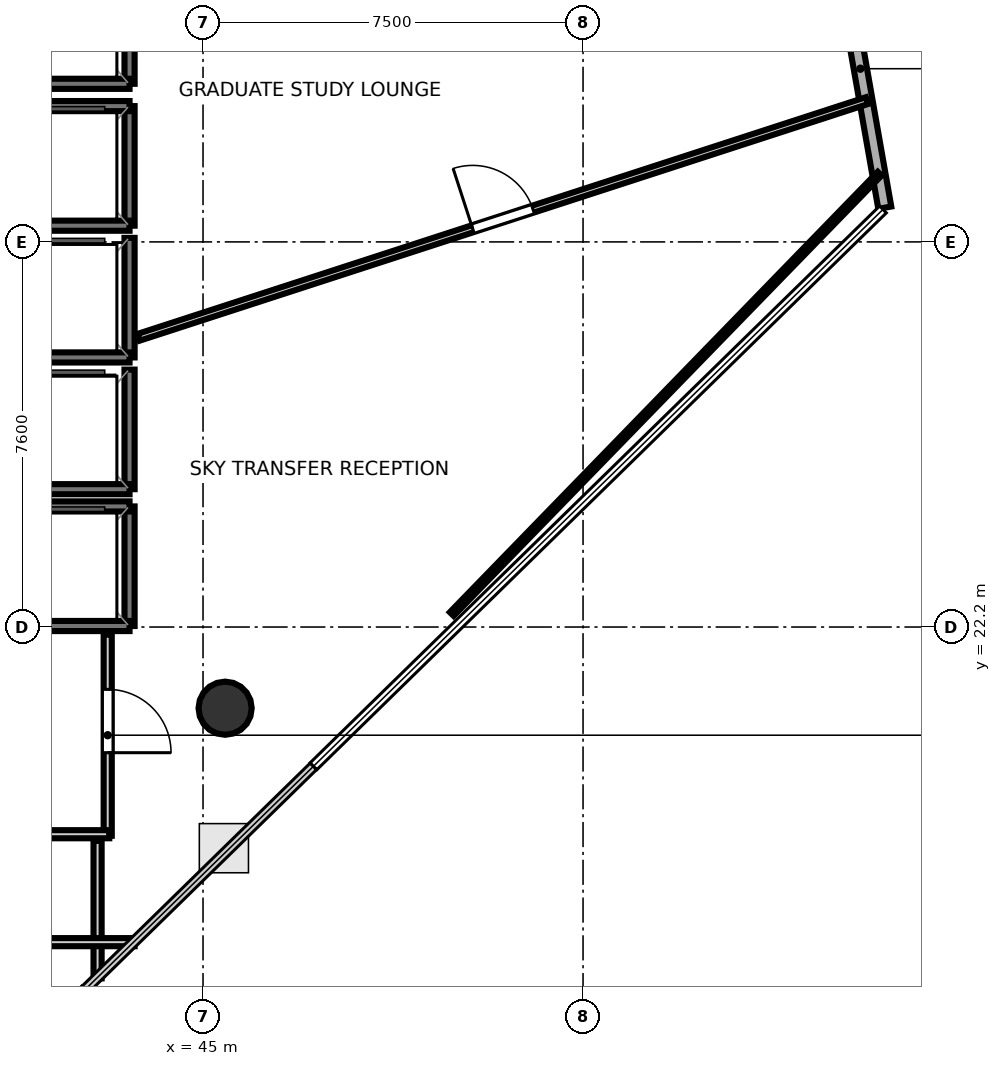
"""IFC4 building model, lengths in metres.
Left out: names, types, materials, properties, quantities, classifications, styles, units other than length and angle.
Written with IfcOpenShell. Run it as: python <this file> out.ifc"""

import sys

from ifc_helpers import new_model, si_unit, direction, frame, frame_2d, origin, origin_2d, place, context, subcontext, project, spatial, rectangle, hollow_circle, extrude, element, fill, save


model = new_model("IFC4")
c1 = context("Model", 3, precision=1e-05, world=origin(), true_north=direction((0.0, 1.0)))
c2 = subcontext(c1, "Body", "Model", "MODEL_VIEW")
j1 = project(units=[si_unit("LENGTHUNIT", "METRE"), si_unit("PLANEANGLEUNIT", "RADIAN")], contexts=[c1])
p1 = place(None, origin())
s1 = spatial("IfcSite", under=j1, at=p1, CompositionType="ELEMENT")
p2 = place(p1, origin())
s2 = spatial("IfcBuilding", under=s1, at=p2, CompositionType="ELEMENT")
p3 = place(p2, frame((0.0, 0.0, 234.5)))
s3 = spatial("IfcBuildingStorey", under=s2, at=p3, CompositionType="ELEMENT", Elevation=234.5)
p4 = place(p3, frame((45.436, 20.598, -0.27), z_axis=(0.0, 0.0, 1.0), x_axis=(1.0, 0.0, 0.0)))
e1 = element("IfcColumn", 1, at=p4, inside=s3, PredefinedType="COLUMN", context=c2, shape_type="SweptSolid", body=[
    extrude(hollow_circle(Radius=0.525, WallThickness=0.028, at=origin_2d()), origin(), (0.0, 0.0, 1.0), 4.77),
])
p5 = place(p3, frame((58.455, 30.475, 0.0), z_axis=(0.0, 0.0, 1.0), x_axis=(-0.173235165229, 0.984880488957, 0.0)))
e2 = element("IfcWall", 2, at=p5, inside=s3, PredefinedType="SOLIDWALL", context=c2, shape_type="SweptSolid", body=[
    extrude(rectangle(XDim=5.57, YDim=0.26, at=frame_2d((2.785, 0.0))), origin(), (0.0, 0.0, 1.0), 4.32),
])
p6 = place(p3, frame((43.55, 30.12, 0.0), z_axis=(0.0, 0.0, 1.0), x_axis=(0.0, 1.0, 0.0)))
e3 = element("IfcWall", 3, at=p6, inside=s3, PredefinedType="SOLIDWALL", context=c2, shape_type="SweptSolid", body=[
    extrude(rectangle(XDim=2.36, YDim=0.2, at=frame_2d((1.18, 0.0))), origin(), (0.0, 0.0, 1.0), 4.32),
])
for number, where, z_axis, x_axis in (
    (4, (41.45, 32.48, 0.0), (0.0, 0.0, 1.0), (1.0, 0.0, 0.0)),
    (5, (41.45, 30.12, 0.0), (0.0, 0.0, 1.0), (1.0, 0.0, 0.0)),
):
    element("IfcWall", number, at=place(p3, frame(where, z_axis=z_axis, x_axis=x_axis)), inside=s3, PredefinedType="SOLIDWALL", context=c2, shape_type="SweptSolid", body=[
        extrude(rectangle(XDim=2.1, YDim=0.2, at=frame_2d((1.05, 0.0))), origin(), (0.0, 0.0, 1.0), 4.32),
    ])
p7 = place(p3, frame((43.55, 27.52, 0.0), z_axis=(0.0, 0.0, 1.0), x_axis=(0.0, 1.0, 0.0)))
e6 = element("IfcWall", 6, at=p7, inside=s3, PredefinedType="SOLIDWALL", context=c2, shape_type="SweptSolid", body=[
    extrude(rectangle(XDim=2.36, YDim=0.2, at=frame_2d((1.18, 0.0))), origin(), (0.0, 0.0, 1.0), 4.32),
])
p8 = place(p3, frame((41.45, 27.52, 0.0), z_axis=(0.0, 0.0, 1.0), x_axis=(1.0, 0.0, 0.0)))
e7 = element("IfcWall", 7, at=p8, inside=s3, PredefinedType="SOLIDWALL", context=c2, shape_type="SweptSolid", body=[
    extrude(rectangle(XDim=2.1, YDim=0.2, at=frame_2d((1.05, 0.0))), origin(), (0.0, 0.0, 1.0), 4.32),
])
p9 = place(p3, frame((43.55, 24.92, 0.0), z_axis=(0.0, 0.0, 1.0), x_axis=(0.0, 1.0, 0.0)))
e8 = element("IfcWall", 8, at=p9, inside=s3, PredefinedType="SOLIDWALL", context=c2, shape_type="SweptSolid", body=[
    extrude(rectangle(XDim=2.36, YDim=0.2, at=frame_2d((1.18, 0.0))), origin(), (0.0, 0.0, 1.0), 4.32),
])
p10 = place(p3, frame((41.45, 24.92, 0.0), z_axis=(0.0, 0.0, 1.0), x_axis=(1.0, 0.0, 0.0)))
e9 = element("IfcWall", 9, at=p10, inside=s3, PredefinedType="SOLIDWALL", context=c2, shape_type="SweptSolid", body=[
    extrude(rectangle(XDim=2.1, YDim=0.2, at=frame_2d((1.05, 0.0))), origin(), (0.0, 0.0, 1.0), 4.32),
])
p11 = place(p3, frame((43.55, 22.22, 0.0), z_axis=(0.0, 0.0, 1.0), x_axis=(0.0, 1.0, 0.0)))
e10 = element("IfcWall", 10, at=p11, inside=s3, PredefinedType="SOLIDWALL", context=c2, shape_type="SweptSolid", body=[
    extrude(rectangle(XDim=2.36, YDim=0.2, at=frame_2d((1.18, 0.0))), origin(), (0.0, 0.0, 1.0), 4.32),
])
for number, where, z_axis, x_axis in (
    (11, (41.45, 24.58, 0.0), (0.0, 0.0, 1.0), (1.0, 0.0, 0.0)),
    (12, (41.45, 22.22, 0.0), (0.0, 0.0, 1.0), (1.0, 0.0, 0.0)),
):
    element("IfcWall", number, at=place(p3, frame(where, z_axis=z_axis, x_axis=x_axis)), inside=s3, PredefinedType="SOLIDWALL", context=c2, shape_type="SweptSolid", body=[
        extrude(rectangle(XDim=2.1, YDim=0.2, at=frame_2d((1.05, 0.0))), origin(), (0.0, 0.0, 1.0), 4.32),
    ])
p12 = place(p3, frame((43.55, 32.92, 0.0), z_axis=(0.0, 0.0, 1.0), x_axis=(0.0, 1.0, 0.0)))
e13 = element("IfcWall", 13, at=p12, inside=s3, PredefinedType="SOLIDWALL", context=c2, shape_type="SweptSolid", body=[
    extrude(rectangle(XDim=2.36, YDim=0.2, at=frame_2d((1.18, 0.0))), origin(), (0.0, 0.0, 1.0), 4.32),
])
p13 = place(p3, frame((41.45, 32.92, 0.0), z_axis=(0.0, 0.0, 1.0), x_axis=(1.0, 0.0, 0.0)))
e14 = element("IfcWall", 14, at=p13, inside=s3, PredefinedType="SOLIDWALL", context=c2, shape_type="SweptSolid", body=[
    extrude(rectangle(XDim=2.1, YDim=0.2, at=frame_2d((1.05, 0.0))), origin(), (0.0, 0.0, 1.0), 4.32),
])
p14 = place(p3, frame((43.119, 22.05, 0.0), z_axis=(0.0, 0.0, 1.0), x_axis=(0.0, -1.0, 0.0)))
e15 = element("IfcWall", 15, at=p14, inside=s3, PredefinedType="PARTITIONING", context=c2, shape_type="SweptSolid", body=[
    extrude(rectangle(XDim=3.97, YDim=0.16, at=frame_2d((1.985, 0.0))), origin(), (0.0, 0.0, 1.0), 3.64),
])
p15 = place(p14, frame((1.08, 0.0, 0.0)))
e16 = element("IfcOpeningElement", 16, at=p15, cuts=e15, PredefinedType="OPENING", context=c2, shape_type="SweptSolid", body=[
    extrude(rectangle(XDim=1.25, YDim=2.2, at=frame_2d((0.625, 1.1))), frame((0.0, 0.09, 0.0), z_axis=(0.0, -1.0, 0.0), x_axis=(1.0, 0.0, 0.0)), (0.0, 0.0, 1.0), 0.18),
])
p16 = place(p3, frame((43.15, 18.111, 0.0), z_axis=(0.0, 0.0, 1.0), x_axis=(-1.0, 0.0, 0.0)))
e17 = element("IfcWall", 17, at=p16, inside=s3, PredefinedType="PARTITIONING", context=c2, shape_type="SweptSolid", body=[
    extrude(rectangle(XDim=2.73, YDim=0.16, at=frame_2d((1.365, 0.0))), origin(), (0.0, 0.0, 1.0), 3.64),
])
p17 = place(p16, frame((1.185, 0.0, 0.0)))
e18 = element("IfcOpeningElement", 18, at=p17, cuts=e17, PredefinedType="OPENING", context=c2, shape_type="SweptSolid", body=[
    extrude(rectangle(XDim=1.2, YDim=2.15, at=frame_2d((0.6, 1.075))), frame((0.0, 0.09, 0.0), z_axis=(0.0, -1.0, 0.0), x_axis=(1.0, 0.0, 0.0)), (0.0, 0.0, 1.0), 0.18),
])
p18 = place(p3, frame((42.919, 17.98, 0.0), z_axis=(0.0, 0.0, 1.0), x_axis=(0.0, -1.0, 0.0)))
e19 = element("IfcWall", 19, at=p18, inside=s3, PredefinedType="PARTITIONING", context=c2, shape_type="SweptSolid", body=[
    extrude(rectangle(XDim=2.714, YDim=0.16, at=frame_2d((1.357, 0.0))), origin(), (0.0, 0.0, 1.0), 3.64),
])
p19 = place(p3, frame((43.65, 15.981, 0.0), z_axis=(0.0, 0.0, 1.0), x_axis=(-1.0, 0.0, 0.0)))
e20 = element("IfcWall", 20, at=p19, inside=s3, PredefinedType="PARTITIONING", context=c2, shape_type="SweptSolid", body=[
    extrude(rectangle(XDim=15.05, YDim=0.16, at=frame_2d((7.525, 0.0))), origin(), (0.0, 0.0, 1.0), 3.64),
])
p20 = place(p19, frame((8.28, 0.0, 0.0)))
e21 = element("IfcOpeningElement", 21, at=p20, cuts=e20, PredefinedType="OPENING", context=c2, shape_type="SweptSolid", body=[
    extrude(rectangle(XDim=1.25, YDim=2.2, at=frame_2d((0.625, 1.1))), frame((0.0, 0.09, 0.0), z_axis=(0.0, -1.0, 0.0), x_axis=(1.0, 0.0, 0.0)), (0.0, 0.0, 1.0), 0.18),
])
p21 = place(p3, frame((43.729, 27.918, 0.0), z_axis=(0.0, 0.0, 1.0), x_axis=(0.951056383536, 0.309017402966, 0.0)))
e22 = element("IfcWall", 22, at=p21, inside=s3, PredefinedType="PARTITIONING", context=c2, shape_type="SweptSolid", body=[
    extrude(rectangle(XDim=15.114, YDim=0.14, at=frame_2d((7.557, 0.0))), origin(), (0.0, 0.0, 1.0), 3.64),
])
p22 = place(p21, frame((6.932, 0.0, 0.0)))
e23 = element("IfcOpeningElement", 23, at=p22, cuts=e22, PredefinedType="OPENING", context=c2, shape_type="SweptSolid", body=[
    extrude(rectangle(XDim=1.25, YDim=2.2, at=frame_2d((0.625, 1.1))), frame((0.0, 0.08, 0.0), z_axis=(0.0, -1.0, 0.0), x_axis=(1.0, 0.0, 0.0)), (0.0, 0.0, 1.0), 0.16),
])
p23 = place(p3, frame((58.354, 31.147, 0.0), z_axis=(0.0, 0.0, 1.0), x_axis=(-0.696869785683, -0.717197672753, 0.0)))
e24 = element("IfcWall", 24, at=p23, inside=s3, PredefinedType="PARTITIONING", context=c2, shape_type="SweptSolid", body=[
    extrude(rectangle(XDim=12.118, YDim=0.105, at=frame_2d((6.059, 0.0))), origin(), (0.0, 0.0, 1.0), 3.64),
])
p24 = place(p15, origin())
e25 = element("IfcDoor", 25, at=p24, inside=s3, OperationType="SINGLE_SWING_RIGHT", PredefinedType="DOOR", context=c2, shape_type="SweptSolid", body=[
    extrude(rectangle(XDim=1.25, YDim=2.2, at=frame_2d((0.625, 1.1))), frame((0.0, 0.025, 0.0), z_axis=(0.0, -1.0, 0.0), x_axis=(1.0, 0.0, 0.0)), (0.0, 0.0, 1.0), 0.05),
])
fill(e16, e25)
p25 = place(p22, origin())
e26 = element("IfcDoor", 26, at=p25, inside=s3, OperationType="SINGLE_SWING_LEFT", PredefinedType="DOOR", context=c2, shape_type="SweptSolid", body=[
    extrude(rectangle(XDim=1.25, YDim=2.2, at=frame_2d((0.625, 1.1))), frame((0.0, 0.025, 0.0), z_axis=(0.0, -1.0, 0.0), x_axis=(1.0, 0.0, 0.0)), (0.0, 0.0, 1.0), 0.05),
])
fill(e23, e26)
save(model, sys.argv[1])
